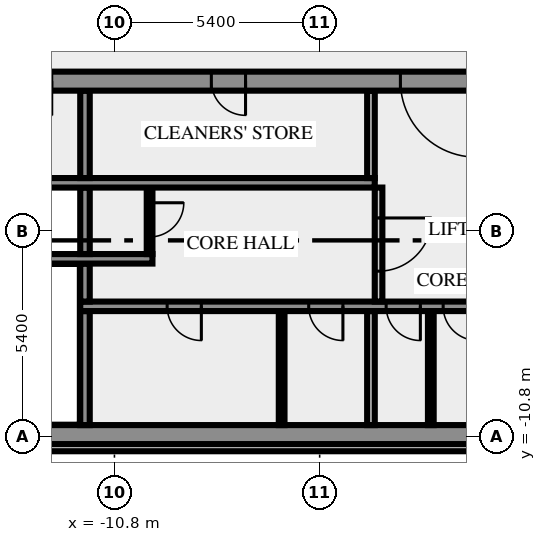
"""IFC4 building model, lengths in metres.
Left out: names, types, materials, properties, quantities, classifications, styles, units other than length and angle.
Written with IfcOpenShell. Run it as: python <this file> out.ifc"""

import sys

from ifc_helpers import new_model, si_unit, direction, frame, frame_2d, origin, place, context, subcontext, project, spatial, rectangle, extrude, element, fill, save


model = new_model("IFC4")
c1 = context("Model", 3, precision=1e-05, world=origin(), true_north=direction((0.0, 1.0)))
c2 = subcontext(c1, "Body", "Model", "MODEL_VIEW")
j1 = project(units=[si_unit("LENGTHUNIT", "METRE"), si_unit("PLANEANGLEUNIT", "RADIAN")], contexts=[c1])
p1 = place(None, origin())
s1 = spatial("IfcSite", under=j1, at=p1, CompositionType="ELEMENT")
p2 = place(p1, origin())
s2 = spatial("IfcBuilding", under=s1, at=p2, CompositionType="ELEMENT")
p3 = place(p2, frame((0.0, 0.0, 168.0)))
s3 = spatial("IfcBuildingStorey", under=s2, at=p3, CompositionType="ELEMENT", Elevation=168.0)
p4 = place(p3, frame((-17.444, -11.088, 0.0), z_axis=(0.0, 0.0, 1.0), x_axis=(1.0, 0.0, 0.0)))
e1 = element("IfcWall", 1, at=p4, inside=s3, PredefinedType="SOLIDWALL", context=c2, shape_type="SweptSolid", body=[
    extrude(rectangle(XDim=34.888, YDim=0.2, at=frame_2d((17.444, 0.0))), origin(), (0.0, 0.0, 1.0), 3.65),
])
p5 = place(p3, frame((-20.0, -10.75, 0.0), z_axis=(0.0, 0.0, 1.0), x_axis=(1.0, 0.0, 0.0)))
e2 = element("IfcWall", 2, at=p5, inside=s3, PredefinedType="SHEAR", context=c2, shape_type="SweptSolid", body=[
    extrude(rectangle(XDim=40.0, YDim=0.5, at=frame_2d((20.0, 0.0))), origin(), (0.0, 0.0, 1.0), 3.65),
])
p6 = place(p5, frame((0.8, 0.0, 1.0)))
e3 = element("IfcOpeningElement", 3, at=p6, cuts=e2, PredefinedType="OPENING", context=c2, shape_type="SweptSolid", body=[
    extrude(rectangle(XDim=1.2, YDim=1.2, at=frame_2d((0.6, 0.6))), frame((0.0, 0.26, 0.0), z_axis=(0.0, -1.0, 0.0), x_axis=(1.0, 0.0, 0.0)), (0.0, 0.0, 1.0), 0.52),
])
p7 = place(p5, frame((38.0, 0.0, 1.0)))
e4 = element("IfcOpeningElement", 4, at=p7, cuts=e2, PredefinedType="OPENING", context=c2, shape_type="SweptSolid", body=[
    extrude(rectangle(XDim=1.2, YDim=1.2, at=frame_2d((0.6, 0.6))), frame((0.0, 0.26, 0.0), z_axis=(0.0, -1.0, 0.0), x_axis=(1.0, 0.0, 0.0)), (0.0, 0.0, 1.0), 0.52),
])
p8 = place(p3, frame((-11.575, -10.5, 0.0), z_axis=(0.0, 0.0, 1.0), x_axis=(0.0, 1.0, 0.0)))
e5 = element("IfcWall", 5, at=p8, inside=s3, PredefinedType="SHEAR", context=c2, shape_type="SweptSolid", body=[
    extrude(rectangle(XDim=3.0, YDim=0.25, at=frame_2d((1.5, 0.0))), origin(), (0.0, 0.0, 1.0), 3.65),
])
p9 = place(p3, frame((-6.4, -10.5, 0.0), z_axis=(0.0, 0.0, 1.0), x_axis=(0.0, 1.0, 0.0)))
e6 = element("IfcWall", 6, at=p9, inside=s3, PredefinedType="PARTITIONING", context=c2, shape_type="SweptSolid", body=[
    extrude(rectangle(XDim=3.0, YDim=0.15, at=frame_2d((1.5, 0.0))), origin(), (0.0, 0.0, 1.0), 3.65),
])
p10 = place(p3, frame((-4.05, -10.5, 0.0), z_axis=(0.0, 0.0, 1.0), x_axis=(0.0, 1.0, 0.0)))
e7 = element("IfcWall", 7, at=p10, inside=s3, PredefinedType="SOLIDWALL", context=c2, shape_type="SweptSolid", body=[
    extrude(rectangle(XDim=3.0, YDim=0.2, at=frame_2d((1.5, 0.0))), origin(), (0.0, 0.0, 1.0), 3.65),
])
p11 = place(p3, frame((-2.475, -10.5, 0.0), z_axis=(0.0, 0.0, 1.0), x_axis=(0.0, 1.0, 0.0)))
e8 = element("IfcWall", 8, at=p11, inside=s3, PredefinedType="PARTITIONING", context=c2, shape_type="SweptSolid", body=[
    extrude(rectangle(XDim=3.0, YDim=0.15, at=frame_2d((1.5, 0.0))), origin(), (0.0, 0.0, 1.0), 3.65),
])
p12 = place(p3, frame((11.7, -7.375, 0.0), z_axis=(0.0, 0.0, 1.0), x_axis=(-1.0, 0.0, 0.0)))
e9 = element("IfcWall", 9, at=p12, inside=s3, PredefinedType="SHEAR", context=c2, shape_type="SweptSolid", body=[
    extrude(rectangle(XDim=23.4, YDim=0.25, at=frame_2d((11.7, 0.0))), origin(), (0.0, 0.0, 1.0), 3.65),
])
p13 = place(p12, frame((20.213, 0.0, 0.0)))
e10 = element("IfcOpeningElement", 10, at=p13, cuts=e9, PredefinedType="OPENING", context=c2, shape_type="SweptSolid", body=[
    extrude(rectangle(XDim=0.9, YDim=2.1, at=frame_2d((0.45, 1.05))), frame((0.0, 0.135, 0.0), z_axis=(0.0, -1.0, 0.0), x_axis=(1.0, 0.0, 0.0)), (0.0, 0.0, 1.0), 0.27),
])
p14 = place(p12, frame((16.488, 0.0, 0.0)))
e11 = element("IfcOpeningElement", 11, at=p14, cuts=e9, PredefinedType="OPENING", context=c2, shape_type="SweptSolid", body=[
    extrude(rectangle(XDim=0.9, YDim=2.1, at=frame_2d((0.45, 1.05))), frame((0.0, 0.135, 0.0), z_axis=(0.0, -1.0, 0.0), x_axis=(1.0, 0.0, 0.0)), (0.0, 0.0, 1.0), 0.27),
])
p15 = place(p12, frame((14.45, 0.0, 0.0)))
e12 = element("IfcOpeningElement", 12, at=p15, cuts=e9, PredefinedType="OPENING", context=c2, shape_type="SweptSolid", body=[
    extrude(rectangle(XDim=0.9, YDim=2.1, at=frame_2d((0.45, 1.05))), frame((0.0, 0.135, 0.0), z_axis=(0.0, -1.0, 0.0), x_axis=(1.0, 0.0, 0.0)), (0.0, 0.0, 1.0), 0.27),
])
p16 = place(p12, frame((12.95, 0.0, 0.0)))
e13 = element("IfcOpeningElement", 13, at=p16, cuts=e9, PredefinedType="OPENING", context=c2, shape_type="SweptSolid", body=[
    extrude(rectangle(XDim=0.9, YDim=2.1, at=frame_2d((0.45, 1.05))), frame((0.0, 0.135, 0.0), z_axis=(0.0, -1.0, 0.0), x_axis=(1.0, 0.0, 0.0)), (0.0, 0.0, 1.0), 0.27),
])
p17 = place(p12, frame((11.475, 0.0, 0.0)))
e14 = element("IfcOpeningElement", 14, at=p17, cuts=e9, PredefinedType="OPENING", context=c2, shape_type="SweptSolid", body=[
    extrude(rectangle(XDim=0.9, YDim=2.1, at=frame_2d((0.45, 1.05))), frame((0.0, 0.135, 0.0), z_axis=(0.0, -1.0, 0.0), x_axis=(1.0, 0.0, 0.0)), (0.0, 0.0, 1.0), 0.27),
])
p18 = place(p12, frame((10.45, 0.0, 0.0)))
e15 = element("IfcOpeningElement", 15, at=p18, cuts=e9, PredefinedType="OPENING", context=c2, shape_type="SweptSolid", body=[
    extrude(rectangle(XDim=0.5, YDim=2.1, at=frame_2d((0.25, 1.05))), frame((0.0, 0.135, 0.0), z_axis=(0.0, -1.0, 0.0), x_axis=(1.0, 0.0, 0.0)), (0.0, 0.0, 1.0), 0.27),
])
p19 = place(p12, frame((8.35, 0.0, 0.0)))
e16 = element("IfcOpeningElement", 16, at=p19, cuts=e9, PredefinedType="OPENING", context=c2, shape_type="SweptSolid", body=[
    extrude(rectangle(XDim=1.1, YDim=2.1, at=frame_2d((0.55, 1.05))), frame((0.0, 0.135, 0.0), z_axis=(0.0, -1.0, 0.0), x_axis=(1.0, 0.0, 0.0)), (0.0, 0.0, 1.0), 0.27),
])
p20 = place(p12, frame((5.85, 0.0, 0.0)))
e17 = element("IfcOpeningElement", 17, at=p20, cuts=e9, PredefinedType="OPENING", context=c2, shape_type="SweptSolid", body=[
    extrude(rectangle(XDim=1.1, YDim=2.1, at=frame_2d((0.55, 1.05))), frame((0.0, 0.135, 0.0), z_axis=(0.0, -1.0, 0.0), x_axis=(1.0, 0.0, 0.0)), (0.0, 0.0, 1.0), 0.27),
])
p21 = place(p12, frame((3.35, 0.0, 0.0)))
e18 = element("IfcOpeningElement", 18, at=p21, cuts=e9, PredefinedType="OPENING", context=c2, shape_type="SweptSolid", body=[
    extrude(rectangle(XDim=1.1, YDim=2.1, at=frame_2d((0.55, 1.05))), frame((0.0, 0.135, 0.0), z_axis=(0.0, -1.0, 0.0), x_axis=(1.0, 0.0, 0.0)), (0.0, 0.0, 1.0), 0.27),
])
p22 = place(p12, frame((0.85, 0.0, 0.0)))
e19 = element("IfcOpeningElement", 19, at=p22, cuts=e9, PredefinedType="OPENING", context=c2, shape_type="SweptSolid", body=[
    extrude(rectangle(XDim=1.1, YDim=2.1, at=frame_2d((0.55, 1.05))), frame((0.0, 0.135, 0.0), z_axis=(0.0, -1.0, 0.0), x_axis=(1.0, 0.0, 0.0)), (0.0, 0.0, 1.0), 0.27),
])
p23 = place(p3, frame((-11.575, -7.25, 0.0), z_axis=(0.0, 0.0, 1.0), x_axis=(0.0, 1.0, 0.0)))
e20 = element("IfcWall", 20, at=p23, inside=s3, PredefinedType="SHEAR", context=c2, shape_type="SweptSolid", body=[
    extrude(rectangle(XDim=1.0, YDim=0.25, at=frame_2d((0.5, 0.0))), origin(), (0.0, 0.0, 1.0), 3.65),
])
p24 = place(p3, frame((-3.85, -4.25, 0.0), z_axis=(0.0, 0.0, 1.0), x_axis=(0.0, -1.0, 0.0)))
e21 = element("IfcWall", 21, at=p24, inside=s3, PredefinedType="SOLIDWALL", context=c2, shape_type="SweptSolid", body=[
    extrude(rectangle(XDim=3.0, YDim=0.2, at=frame_2d((1.5, 0.0))), origin(), (0.0, 0.0, 1.0), 3.65),
])
p25 = place(p24, frame((0.8, 0.0, 0.0)))
e22 = element("IfcOpeningElement", 22, at=p25, cuts=e21, PredefinedType="OPENING", context=c2, shape_type="SweptSolid", body=[
    extrude(rectangle(XDim=1.4, YDim=2.1, at=frame_2d((0.7, 1.05))), frame((0.0, 0.11, 0.0), z_axis=(0.0, -1.0, 0.0), x_axis=(1.0, 0.0, 0.0)), (0.0, 0.0, 1.0), 0.22),
])
p26 = place(p3, frame((-9.8, -6.125, 0.0), z_axis=(0.0, 0.0, 1.0), x_axis=(-1.0, 0.0, 0.0)))
e23 = element("IfcWall", 23, at=p26, inside=s3, PredefinedType="SHEAR", context=c2, shape_type="SweptSolid", body=[
    extrude(rectangle(XDim=10.2, YDim=0.25, at=frame_2d((5.1, 0.0))), origin(), (0.0, 0.0, 1.0), 3.65),
])
p27 = place(p26, frame((7.85, 0.0, 0.0)))
e24 = element("IfcOpeningElement", 24, at=p27, cuts=e23, PredefinedType="OPENING", context=c2, shape_type="SweptSolid", body=[
    extrude(rectangle(XDim=1.8, YDim=2.1, at=frame_2d((0.9, 1.05))), frame((0.0, 0.135, 0.0), z_axis=(0.0, -1.0, 0.0), x_axis=(1.0, 0.0, 0.0)), (0.0, 0.0, 1.0), 0.27),
])
p28 = place(p3, frame((-11.575, -6.0, 0.0), z_axis=(0.0, 0.0, 1.0), x_axis=(0.0, 1.0, 0.0)))
e25 = element("IfcWall", 25, at=p28, inside=s3, PredefinedType="SHEAR", context=c2, shape_type="SweptSolid", body=[
    extrude(rectangle(XDim=1.75, YDim=0.25, at=frame_2d((0.875, 0.0))), origin(), (0.0, 0.0, 1.0), 3.65),
])
p29 = place(p3, frame((-9.875, -4.25, 0.0), z_axis=(0.0, 0.0, 1.0), x_axis=(0.0, -1.0, 0.0)))
e26 = element("IfcWall", 26, at=p29, inside=s3, PredefinedType="PARTITIONING", context=c2, shape_type="SweptSolid", body=[
    extrude(rectangle(XDim=1.75, YDim=0.15, at=frame_2d((0.875, 0.0))), origin(), (0.0, 0.0, 1.0), 3.65),
])
p30 = place(p29, frame((0.4, 0.0, 0.0)))
e27 = element("IfcOpeningElement", 27, at=p30, cuts=e26, PredefinedType="OPENING", context=c2, shape_type="SweptSolid", body=[
    extrude(rectangle(XDim=0.9, YDim=2.1, at=frame_2d((0.45, 1.05))), frame((0.0, 0.085, 0.0), z_axis=(0.0, -1.0, 0.0), x_axis=(1.0, 0.0, 0.0)), (0.0, 0.0, 1.0), 0.17),
])
p31 = place(p3, frame((-14.35, -4.125, 0.0), z_axis=(0.0, 0.0, 1.0), x_axis=(1.0, 0.0, 0.0)))
e28 = element("IfcWall", 28, at=p31, inside=s3, PredefinedType="SHEAR", context=c2, shape_type="SweptSolid", body=[
    extrude(rectangle(XDim=10.4, YDim=0.25, at=frame_2d((5.2, 0.0))), origin(), (0.0, 0.0, 1.0), 3.65),
])
p32 = place(p3, frame((-11.575, -4.0, 0.0), z_axis=(0.0, 0.0, 1.0), x_axis=(0.0, 1.0, 0.0)))
e29 = element("IfcWall", 29, at=p32, inside=s3, PredefinedType="SHEAR", context=c2, shape_type="SweptSolid", body=[
    extrude(rectangle(XDim=2.3, YDim=0.25, at=frame_2d((1.15, 0.0))), origin(), (0.0, 0.0, 1.0), 3.65),
])
p33 = place(p3, frame((-4.05, -4.0, 0.0), z_axis=(0.0, 0.0, 1.0), x_axis=(0.0, 1.0, 0.0)))
e30 = element("IfcWall", 30, at=p33, inside=s3, PredefinedType="SOLIDWALL", context=c2, shape_type="SweptSolid", body=[
    extrude(rectangle(XDim=2.3, YDim=0.2, at=frame_2d((1.15, 0.0))), origin(), (0.0, 0.0, 1.0), 3.65),
])
p34 = place(p3, frame((20.49, -1.45, 0.0), z_axis=(0.0, 0.0, 1.0), x_axis=(-1.0, 0.0, 0.0)))
e31 = element("IfcWall", 31, at=p34, inside=s3, PredefinedType="SHEAR", context=c2, shape_type="SweptSolid", body=[
    extrude(rectangle(XDim=40.98, YDim=0.5, at=frame_2d((20.49, 0.0))), origin(), (0.0, 0.0, 1.0), 3.65),
])
p35 = place(p34, frame((38.14, 0.0, 0.0)))
e32 = element("IfcOpeningElement", 32, at=p35, cuts=e31, PredefinedType="OPENING", context=c2, shape_type="SweptSolid", body=[
    extrude(rectangle(XDim=1.8, YDim=2.1, at=frame_2d((0.9, 1.05))), frame((0.0, 0.26, 0.0), z_axis=(0.0, -1.0, 0.0), x_axis=(1.0, 0.0, 0.0)), (0.0, 0.0, 1.0), 0.52),
])
p36 = place(p34, frame((36.728, 0.0, 0.0)))
e33 = element("IfcOpeningElement", 33, at=p36, cuts=e31, PredefinedType="OPENING", context=c2, shape_type="SweptSolid", body=[
    extrude(rectangle(XDim=0.8, YDim=2.1, at=frame_2d((0.4, 1.05))), frame((0.0, 0.26, 0.0), z_axis=(0.0, -1.0, 0.0), x_axis=(1.0, 0.0, 0.0)), (0.0, 0.0, 1.0), 0.52),
])
p37 = place(p34, frame((35.153, 0.0, 0.0)))
e34 = element("IfcOpeningElement", 34, at=p37, cuts=e31, PredefinedType="OPENING", context=c2, shape_type="SweptSolid", body=[
    extrude(rectangle(XDim=0.8, YDim=2.1, at=frame_2d((0.4, 1.05))), frame((0.0, 0.26, 0.0), z_axis=(0.0, -1.0, 0.0), x_axis=(1.0, 0.0, 0.0)), (0.0, 0.0, 1.0), 0.52),
])
p38 = place(p34, frame((32.94, 0.0, 0.0)))
e35 = element("IfcOpeningElement", 35, at=p38, cuts=e31, PredefinedType="OPENING", context=c2, shape_type="SweptSolid", body=[
    extrude(rectangle(XDim=0.9, YDim=2.1, at=frame_2d((0.45, 1.05))), frame((0.0, 0.26, 0.0), z_axis=(0.0, -1.0, 0.0), x_axis=(1.0, 0.0, 0.0)), (0.0, 0.0, 1.0), 0.52),
])
p39 = place(p34, frame((27.84, 0.0, 0.0)))
e36 = element("IfcOpeningElement", 36, at=p39, cuts=e31, PredefinedType="OPENING", context=c2, shape_type="SweptSolid", body=[
    extrude(rectangle(XDim=0.9, YDim=2.1, at=frame_2d((0.45, 1.05))), frame((0.0, 0.26, 0.0), z_axis=(0.0, -1.0, 0.0), x_axis=(1.0, 0.0, 0.0)), (0.0, 0.0, 1.0), 0.52),
])
p40 = place(p34, frame((21.765, 0.0, 0.0)))
e37 = element("IfcOpeningElement", 37, at=p40, cuts=e31, PredefinedType="OPENING", context=c2, shape_type="SweptSolid", body=[
    extrude(rectangle(XDim=2.0, YDim=2.1, at=frame_2d((1.0, 1.05))), frame((0.0, 0.26, 0.0), z_axis=(0.0, -1.0, 0.0), x_axis=(1.0, 0.0, 0.0)), (0.0, 0.0, 1.0), 0.52),
])
p41 = place(p34, frame((7.14, 0.0, 0.0)))
e38 = element("IfcOpeningElement", 38, at=p41, cuts=e31, PredefinedType="OPENING", context=c2, shape_type="SweptSolid", body=[
    extrude(rectangle(XDim=0.9, YDim=2.1, at=frame_2d((0.45, 1.05))), frame((0.0, 0.26, 0.0), z_axis=(0.0, -1.0, 0.0), x_axis=(1.0, 0.0, 0.0)), (0.0, 0.0, 1.0), 0.52),
])
p42 = place(p34, frame((4.19, 0.0, 0.0)))
e39 = element("IfcOpeningElement", 39, at=p42, cuts=e31, PredefinedType="OPENING", context=c2, shape_type="SweptSolid", body=[
    extrude(rectangle(XDim=0.9, YDim=2.1, at=frame_2d((0.45, 1.05))), frame((0.0, 0.26, 0.0), z_axis=(0.0, -1.0, 0.0), x_axis=(1.0, 0.0, 0.0)), (0.0, 0.0, 1.0), 0.52),
])
p43 = place(p34, frame((1.04, 0.0, 0.0)))
e40 = element("IfcOpeningElement", 40, at=p43, cuts=e31, PredefinedType="OPENING", context=c2, shape_type="SweptSolid", body=[
    extrude(rectangle(XDim=1.8, YDim=2.1, at=frame_2d((0.9, 1.05))), frame((0.0, 0.26, 0.0), z_axis=(0.0, -1.0, 0.0), x_axis=(1.0, 0.0, 0.0)), (0.0, 0.0, 1.0), 0.52),
])
p44 = place(p13, origin())
e41 = element("IfcDoor", 41, at=p44, inside=s3, OperationType="SINGLE_SWING_RIGHT", PredefinedType="DOOR", context=c2, shape_type="SweptSolid", body=[
    extrude(rectangle(XDim=0.9, YDim=2.1, at=frame_2d((0.45, 1.05))), frame((0.0, 0.025, 0.0), z_axis=(0.0, -1.0, 0.0), x_axis=(1.0, 0.0, 0.0)), (0.0, 0.0, 1.0), 0.05),
])
fill(e10, e41)
p45 = place(p14, origin())
e42 = element("IfcDoor", 42, at=p45, inside=s3, OperationType="SINGLE_SWING_RIGHT", PredefinedType="DOOR", context=c2, shape_type="SweptSolid", body=[
    extrude(rectangle(XDim=0.9, YDim=2.1, at=frame_2d((0.45, 1.05))), frame((0.0, 0.025, 0.0), z_axis=(0.0, -1.0, 0.0), x_axis=(1.0, 0.0, 0.0)), (0.0, 0.0, 1.0), 0.05),
])
fill(e11, e42)
p46 = place(p15, origin())
e43 = element("IfcDoor", 43, at=p46, inside=s3, OperationType="SINGLE_SWING_RIGHT", PredefinedType="DOOR", context=c2, shape_type="SweptSolid", body=[
    extrude(rectangle(XDim=0.9, YDim=2.1, at=frame_2d((0.45, 1.05))), frame((0.0, 0.025, 0.0), z_axis=(0.0, -1.0, 0.0), x_axis=(1.0, 0.0, 0.0)), (0.0, 0.0, 1.0), 0.05),
])
fill(e12, e43)
p47 = place(p16, origin())
e44 = element("IfcDoor", 44, at=p47, inside=s3, OperationType="SINGLE_SWING_RIGHT", PredefinedType="DOOR", context=c2, shape_type="SweptSolid", body=[
    extrude(rectangle(XDim=0.9, YDim=2.1, at=frame_2d((0.45, 1.05))), frame((0.0, 0.025, 0.0), z_axis=(0.0, -1.0, 0.0), x_axis=(1.0, 0.0, 0.0)), (0.0, 0.0, 1.0), 0.05),
])
fill(e13, e44)
p48 = place(p25, origin())
e45 = element("IfcDoor", 45, at=p48, inside=s3, OperationType="DOUBLE_DOOR_SINGLE_SWING", PredefinedType="DOOR", context=c2, shape_type="SweptSolid", body=[
    extrude(rectangle(XDim=1.4, YDim=2.1, at=frame_2d((0.7, 1.05))), frame((0.0, 0.025, 0.0), z_axis=(0.0, -1.0, 0.0), x_axis=(1.0, 0.0, 0.0)), (0.0, 0.0, 1.0), 0.05),
])
fill(e22, e45)
p49 = place(p30, origin())
e46 = element("IfcDoor", 46, at=p49, inside=s3, OperationType="SINGLE_SWING_LEFT", PredefinedType="DOOR", context=c2, shape_type="SweptSolid", body=[
    extrude(rectangle(XDim=0.9, YDim=2.1, at=frame_2d((0.45, 1.05))), frame((0.0, 0.025, 0.0), z_axis=(0.0, -1.0, 0.0), x_axis=(1.0, 0.0, 0.0)), (0.0, 0.0, 1.0), 0.05),
])
fill(e27, e46)
p50 = place(p39, origin())
e47 = element("IfcDoor", 47, at=p50, inside=s3, OperationType="SINGLE_SWING_RIGHT", PredefinedType="DOOR", context=c2, shape_type="SweptSolid", body=[
    extrude(rectangle(XDim=0.9, YDim=2.1, at=frame_2d((0.45, 1.05))), frame((0.0, 0.025, 0.0), z_axis=(0.0, -1.0, 0.0), x_axis=(1.0, 0.0, 0.0)), (0.0, 0.0, 1.0), 0.05),
])
fill(e36, e47)
p51 = place(p40, origin())
e48 = element("IfcDoor", 48, at=p51, inside=s3, OperationType="DOUBLE_DOOR_SINGLE_SWING", PredefinedType="DOOR", context=c2, shape_type="SweptSolid", body=[
    extrude(rectangle(XDim=2.0, YDim=2.1, at=frame_2d((1.0, 1.05))), frame((0.0, 0.025, 0.0), z_axis=(0.0, -1.0, 0.0), x_axis=(1.0, 0.0, 0.0)), (0.0, 0.0, 1.0), 0.05),
])
fill(e37, e48)
save(model, sys.argv[1])
